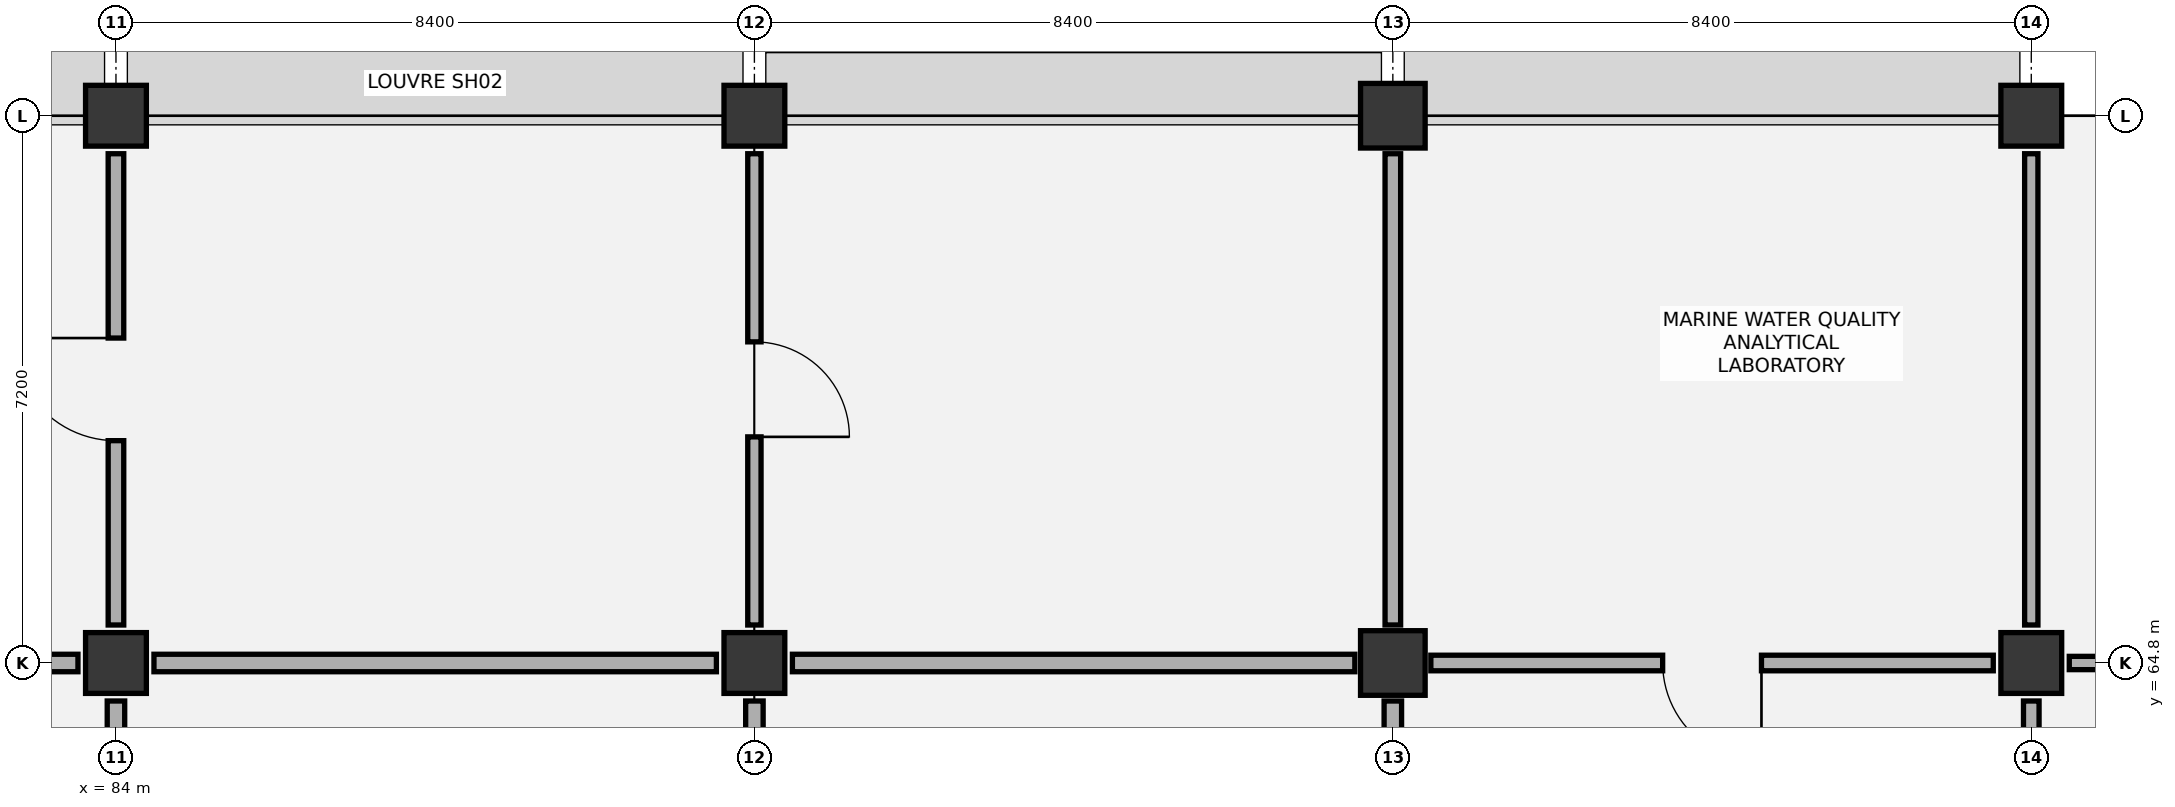
"""IFC4 building model, lengths in metres.
Left out: names, types, materials, properties, quantities, classifications, styles, units other than length and angle.
Written with IfcOpenShell. Run it as: python <this file> out.ifc"""

import sys

from ifc_helpers import new_model, si_unit, direction, frame, frame_2d, origin, origin_2d, place, context, subcontext, project, spatial, rectangle, extrude, element, fill, save


model = new_model("IFC4")
c1 = context("Model", 3, precision=1e-05, world=origin(), true_north=direction((0.0, 1.0)))
c2 = subcontext(c1, "Body", "Model", "MODEL_VIEW")
j1 = project(units=[si_unit("LENGTHUNIT", "METRE"), si_unit("PLANEANGLEUNIT", "RADIAN")], contexts=[c1])
p1 = place(None, origin())
s1 = spatial("IfcSite", under=j1, at=p1, CompositionType="ELEMENT")
p2 = place(p1, origin())
s2 = spatial("IfcBuilding", under=s1, at=p2, CompositionType="ELEMENT")
p3 = place(p2, frame((0.0, 0.0, 16.8)))
s3 = spatial("IfcBuildingStorey", under=s2, at=p3, CompositionType="ELEMENT", Elevation=16.8)
for number, where, z_axis, x_axis in (
    (1, (84.0, 64.8, 0.0), (0.0, 0.0, 1.0), (1.0, 0.0, 0.0)),
    (2, (84.0, 72.0, 0.0), (0.0, 0.0, 1.0), (1.0, 0.0, 0.0)),
    (3, (92.4, 64.8, 0.0), (0.0, 0.0, 1.0), (1.0, 0.0, 0.0)),
    (4, (92.4, 72.0, 0.0), (0.0, 0.0, 1.0), (1.0, 0.0, 0.0)),
):
    element("IfcColumn", number, at=place(p3, frame(where, z_axis=z_axis, x_axis=x_axis)), inside=s3, PredefinedType="COLUMN", context=c2, shape_type="SweptSolid", body=[
        extrude(rectangle(XDim=0.8, YDim=0.8, at=origin_2d()), origin(), (0.0, 0.0, 1.0), 5.4),
    ])
for number, where, z_axis, x_axis in (
    (5, (100.8, 64.8, 0.0), (0.0, 0.0, 1.0), (1.0, 0.0, 0.0)),
    (6, (100.8, 72.0, 0.0), (0.0, 0.0, 1.0), (1.0, 0.0, 0.0)),
):
    element("IfcColumn", number, at=place(p3, frame(where, z_axis=z_axis, x_axis=x_axis)), inside=s3, PredefinedType="COLUMN", context=c2, shape_type="SweptSolid", body=[
        extrude(rectangle(XDim=0.85, YDim=0.85, at=origin_2d()), origin(), (0.0, 0.0, 1.0), 5.4),
    ])
for number, where, z_axis, x_axis in (
    (7, (109.2, 64.8, 0.0), (0.0, 0.0, 1.0), (1.0, 0.0, 0.0)),
    (8, (109.2, 72.0, 0.0), (0.0, 0.0, 1.0), (1.0, 0.0, 0.0)),
):
    element("IfcColumn", number, at=place(p3, frame(where, z_axis=z_axis, x_axis=x_axis)), inside=s3, PredefinedType="COLUMN", context=c2, shape_type="SweptSolid", body=[
        extrude(rectangle(XDim=0.8, YDim=0.8, at=origin_2d()), origin(), (0.0, 0.0, 1.0), 5.4),
    ])
p4 = place(p3, frame((84.0, 58.1, 0.0), z_axis=(0.0, 0.0, 1.0), x_axis=(0.0, 1.0, 0.0)))
e9 = element("IfcWall", 9, at=p4, inside=s3, PredefinedType="PARTITIONING", context=c2, shape_type="SweptSolid", body=[
    extrude(rectangle(XDim=6.2, YDim=0.23, at=frame_2d((3.1, 0.0))), origin(), (0.0, 0.0, 1.0), 4.245),
])
p5 = place(p4, frame((0.25, 0.0, 0.0)))
e10 = element("IfcOpeningElement", 10, at=p5, cuts=e9, PredefinedType="OPENING", context=c2, shape_type="SweptSolid", body=[
    extrude(rectangle(XDim=1.05, YDim=2.15, at=frame_2d((0.525, 1.075))), frame((0.0, 0.125, 0.0), z_axis=(0.0, -1.0, 0.0), x_axis=(1.0, 0.0, 0.0)), (0.0, 0.0, 1.0), 0.25),
])
p6 = place(p3, frame((76.1, 64.8, 0.0), z_axis=(0.0, 0.0, 1.0), x_axis=(1.0, 0.0, 0.0)))
e11 = element("IfcWall", 11, at=p6, inside=s3, PredefinedType="PARTITIONING", context=c2, shape_type="SweptSolid", body=[
    extrude(rectangle(XDim=7.4, YDim=0.23, at=frame_2d((3.7, 0.0))), origin(), (0.0, 0.0, 1.0), 4.195),
])
p7 = place(p3, frame((84.0, 65.3, 0.0), z_axis=(0.0, 0.0, 1.0), x_axis=(0.0, 1.0, 0.0)))
e12 = element("IfcWall", 12, at=p7, inside=s3, PredefinedType="PARTITIONING", context=c2, shape_type="SweptSolid", body=[
    extrude(rectangle(XDim=6.2, YDim=0.205, at=frame_2d((3.1, 0.0))), origin(), (0.0, 0.0, 1.0), 4.445),
])
p8 = place(p7, frame((2.425, 0.0, 0.0)))
e13 = element("IfcOpeningElement", 13, at=p8, cuts=e12, PredefinedType="OPENING", context=c2, shape_type="SweptSolid", body=[
    extrude(rectangle(XDim=1.35, YDim=2.15, at=frame_2d((0.675, 1.075))), frame((0.0, 0.113, 0.0), z_axis=(0.0, -1.0, 0.0), x_axis=(1.0, 0.0, 0.0)), (0.0, 0.0, 1.0), 0.225),
])
p9 = place(p3, frame((92.4, 58.1, 0.0), z_axis=(0.0, 0.0, 1.0), x_axis=(0.0, 1.0, 0.0)))
e14 = element("IfcWall", 14, at=p9, inside=s3, PredefinedType="PARTITIONING", context=c2, shape_type="SweptSolid", body=[
    extrude(rectangle(XDim=6.2, YDim=0.23, at=frame_2d((3.1, 0.0))), origin(), (0.0, 0.0, 1.0), 4.445),
])
p10 = place(p9, frame((0.25, 0.0, 0.0)))
e15 = element("IfcOpeningElement", 15, at=p10, cuts=e14, PredefinedType="OPENING", context=c2, shape_type="SweptSolid", body=[
    extrude(rectangle(XDim=1.05, YDim=2.15, at=frame_2d((0.525, 1.075))), frame((0.0, 0.125, 0.0), z_axis=(0.0, -1.0, 0.0), x_axis=(1.0, 0.0, 0.0)), (0.0, 0.0, 1.0), 0.25),
])
p11 = place(p3, frame((84.5, 64.8, 0.0), z_axis=(0.0, 0.0, 1.0), x_axis=(1.0, 0.0, 0.0)))
e16 = element("IfcWall", 16, at=p11, inside=s3, PredefinedType="PARTITIONING", context=c2, shape_type="SweptSolid", body=[
    extrude(rectangle(XDim=7.4, YDim=0.23, at=frame_2d((3.7, 0.0))), origin(), (0.0, 0.0, 1.0), 4.195),
])
p12 = place(p3, frame((92.4, 65.3, 0.0), z_axis=(0.0, 0.0, 1.0), x_axis=(0.0, 1.0, 0.0)))
e17 = element("IfcWall", 17, at=p12, inside=s3, PredefinedType="PARTITIONING", context=c2, shape_type="SweptSolid", body=[
    extrude(rectangle(XDim=6.2, YDim=0.175, at=frame_2d((3.1, 0.0))), origin(), (0.0, 0.0, 1.0), 4.245),
])
p13 = place(p12, frame((2.475, 0.0, 0.0)))
e18 = element("IfcOpeningElement", 18, at=p13, cuts=e17, PredefinedType="OPENING", context=c2, shape_type="SweptSolid", body=[
    extrude(rectangle(XDim=1.25, YDim=2.1, at=frame_2d((0.625, 1.05))), frame((0.0, 0.097, 0.0), z_axis=(0.0, -1.0, 0.0), x_axis=(1.0, 0.0, 0.0)), (0.0, 0.0, 1.0), 0.195),
])
p14 = place(p3, frame((100.8, 58.1, 0.0), z_axis=(0.0, 0.0, 1.0), x_axis=(0.0, 1.0, 0.0)))
e19 = element("IfcWall", 19, at=p14, inside=s3, PredefinedType="PARTITIONING", context=c2, shape_type="SweptSolid", body=[
    extrude(rectangle(XDim=6.2, YDim=0.23, at=frame_2d((3.1, 0.0))), origin(), (0.0, 0.0, 1.0), 4.245),
])
p15 = place(p3, frame((92.9, 64.8, 0.0), z_axis=(0.0, 0.0, 1.0), x_axis=(1.0, 0.0, 0.0)))
e20 = element("IfcWall", 20, at=p15, inside=s3, PredefinedType="PARTITIONING", context=c2, shape_type="SweptSolid", body=[
    extrude(rectangle(XDim=7.4, YDim=0.23, at=frame_2d((3.7, 0.0))), origin(), (0.0, 0.0, 1.0), 4.195),
])
p16 = place(p3, frame((100.8, 65.3, 0.0), z_axis=(0.0, 0.0, 1.0), x_axis=(0.0, 1.0, 0.0)))
e21 = element("IfcWall", 21, at=p16, inside=s3, PredefinedType="PARTITIONING", context=c2, shape_type="SweptSolid", body=[
    extrude(rectangle(XDim=6.2, YDim=0.205, at=frame_2d((3.1, 0.0))), origin(), (0.0, 0.0, 1.0), 4.545),
])
p17 = place(p3, frame((109.2, 58.1, 0.0), z_axis=(0.0, 0.0, 1.0), x_axis=(0.0, 1.0, 0.0)))
e22 = element("IfcWall", 22, at=p17, inside=s3, PredefinedType="PARTITIONING", context=c2, shape_type="SweptSolid", body=[
    extrude(rectangle(XDim=6.2, YDim=0.205, at=frame_2d((3.1, 0.0))), origin(), (0.0, 0.0, 1.0), 4.545),
])
p18 = place(p17, frame((2.35, 0.0, 0.0)))
e23 = element("IfcOpeningElement", 23, at=p18, cuts=e22, PredefinedType="OPENING", context=c2, shape_type="SweptSolid", body=[
    extrude(rectangle(XDim=1.5, YDim=2.2, at=frame_2d((0.75, 1.1))), frame((0.0, 0.113, 0.0), z_axis=(0.0, -1.0, 0.0), x_axis=(1.0, 0.0, 0.0)), (0.0, 0.0, 1.0), 0.225),
])
p19 = place(p3, frame((101.3, 64.8, 0.0), z_axis=(0.0, 0.0, 1.0), x_axis=(1.0, 0.0, 0.0)))
e24 = element("IfcWall", 24, at=p19, inside=s3, PredefinedType="PARTITIONING", context=c2, shape_type="SweptSolid", body=[
    extrude(rectangle(XDim=7.4, YDim=0.205, at=frame_2d((3.7, 0.0))), origin(), (0.0, 0.0, 1.0), 4.195),
])
p20 = place(p19, frame((3.05, 0.0, 0.0)))
e25 = element("IfcOpeningElement", 25, at=p20, cuts=e24, PredefinedType="OPENING", context=c2, shape_type="SweptSolid", body=[
    extrude(rectangle(XDim=1.3, YDim=2.15, at=frame_2d((0.65, 1.075))), frame((0.0, 0.113, 0.0), z_axis=(0.0, -1.0, 0.0), x_axis=(1.0, 0.0, 0.0)), (0.0, 0.0, 1.0), 0.225),
])
p21 = place(p3, frame((109.2, 65.3, 0.0), z_axis=(0.0, 0.0, 1.0), x_axis=(0.0, 1.0, 0.0)))
e26 = element("IfcWall", 26, at=p21, inside=s3, PredefinedType="PARTITIONING", context=c2, shape_type="SweptSolid", body=[
    extrude(rectangle(XDim=6.2, YDim=0.175, at=frame_2d((3.1, 0.0))), origin(), (0.0, 0.0, 1.0), 4.245),
])
p22 = place(p3, frame((109.7, 64.8, 0.0), z_axis=(0.0, 0.0, 1.0), x_axis=(1.0, 0.0, 0.0)))
e27 = element("IfcWall", 27, at=p22, inside=s3, PredefinedType="PARTITIONING", context=c2, shape_type="SweptSolid", body=[
    extrude(rectangle(XDim=7.4, YDim=0.175, at=frame_2d((3.7, 0.0))), origin(), (0.0, 0.0, 1.0), 4.195),
])
p23 = place(p22, frame((3.075, 0.0, 0.0)))
e28 = element("IfcOpeningElement", 28, at=p23, cuts=e27, PredefinedType="OPENING", context=c2, shape_type="SweptSolid", body=[
    extrude(rectangle(XDim=1.25, YDim=2.1, at=frame_2d((0.625, 1.05))), frame((0.0, 0.097, 0.0), z_axis=(0.0, -1.0, 0.0), x_axis=(1.0, 0.0, 0.0)), (0.0, 0.0, 1.0), 0.195),
])
p24 = place(p8, origin())
e29 = element("IfcDoor", 29, at=p24, inside=s3, OperationType="SINGLE_SWING_RIGHT", PredefinedType="DOOR", context=c2, shape_type="SweptSolid", body=[
    extrude(rectangle(XDim=1.35, YDim=2.15, at=frame_2d((0.675, 1.075))), frame((0.0, 0.025, 0.0), z_axis=(0.0, -1.0, 0.0), x_axis=(1.0, 0.0, 0.0)), (0.0, 0.0, 1.0), 0.05),
])
fill(e13, e29)
p25 = place(p13, frame((1.25, 0.0, 0.0), z_axis=(0.0, 0.0, 1.0), x_axis=(-1.0, 0.0, 0.0)))
e30 = element("IfcDoor", 30, at=p25, inside=s3, OperationType="SINGLE_SWING_RIGHT", PredefinedType="DOOR", context=c2, shape_type="SweptSolid", body=[
    extrude(rectangle(XDim=1.25, YDim=2.1, at=frame_2d((0.625, 1.05))), frame((0.0, 0.025, 0.0), z_axis=(0.0, -1.0, 0.0), x_axis=(1.0, 0.0, 0.0)), (0.0, 0.0, 1.0), 0.05),
])
fill(e18, e30)
p26 = place(p20, frame((1.3, 0.0, 0.0), z_axis=(0.0, 0.0, 1.0), x_axis=(-1.0, 0.0, 0.0)))
e31 = element("IfcDoor", 31, at=p26, inside=s3, OperationType="SINGLE_SWING_LEFT", PredefinedType="DOOR", context=c2, shape_type="SweptSolid", body=[
    extrude(rectangle(XDim=1.3, YDim=2.15, at=frame_2d((0.65, 1.075))), frame((0.0, 0.025, 0.0), z_axis=(0.0, -1.0, 0.0), x_axis=(1.0, 0.0, 0.0)), (0.0, 0.0, 1.0), 0.05),
])
fill(e25, e31)
save(model, sys.argv[1])
